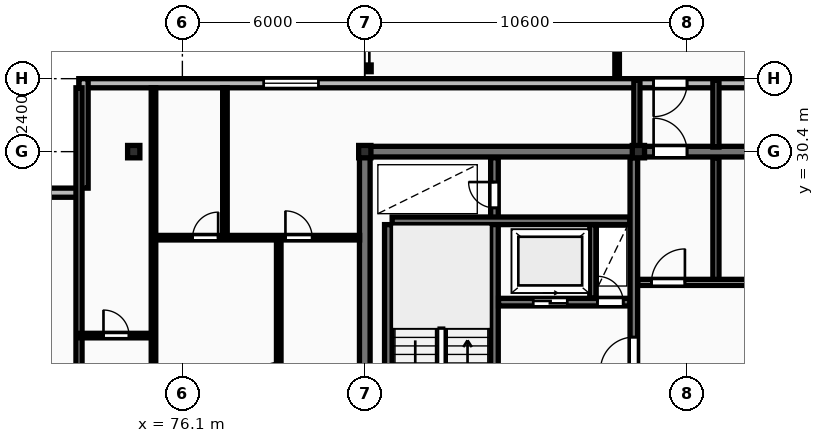
"""IFC4 building model, lengths in metres.
Left out: names, types, materials, properties, quantities, classifications, styles, units other than length and angle.
Written with IfcOpenShell. Run it as: python <this file> out.ifc"""

import sys

from ifc_helpers import new_model, si_unit, direction, frame, frame_2d, origin, origin_2d, place, context, subcontext, project, spatial, rectangle, i_section, extrude, element, fill, save


model = new_model("IFC4")
c1 = context("Model", 3, precision=1e-05, world=origin(), true_north=direction((0.0, 1.0)))
c2 = subcontext(c1, "Body", "Model", "MODEL_VIEW")
j1 = project(units=[si_unit("LENGTHUNIT", "METRE"), si_unit("PLANEANGLEUNIT", "RADIAN")], contexts=[c1])
p1 = place(None, origin())
s1 = spatial("IfcSite", under=j1, at=p1, CompositionType="ELEMENT")
p2 = place(p1, origin())
s2 = spatial("IfcBuilding", under=s1, at=p2, CompositionType="ELEMENT")
p3 = place(p2, frame((0.0, 0.0, 142.9)))
s3 = spatial("IfcBuildingStorey", under=s2, at=p3, CompositionType="ELEMENT", Elevation=142.9)
for number, where, z_axis, x_axis in (
    (1, (74.5, 30.4, 0.0), (0.0, 0.0, 1.0), (1.0, 0.0, 0.0)),
    (2, (82.1, 30.4, 0.0), (0.0, 0.0, 1.0), (1.0, 0.0, 0.0)),
    (3, (91.1, 30.4, 0.0), (0.0, 0.0, 1.0), (1.0, 0.0, 0.0)),
):
    element("IfcColumn", number, at=place(p3, frame(where, z_axis=z_axis, x_axis=x_axis)), inside=s3, PredefinedType="COLUMN", context=c2, shape_type="SweptSolid", body=[
        extrude(i_section(OverallWidth=0.403, OverallDepth=0.406, WebThickness=0.027, FlangeThickness=0.043, FilletRadius=0.015, at=origin_2d()), origin(), (0.0, 0.0, 1.0), 3.6),
    ])
p4 = place(p3, frame((130.7, 32.65, 0.0), z_axis=(0.0, 0.0, 1.0), x_axis=(-1.0, 0.0, 0.0)))
e4 = element("IfcWall", 4, at=p4, inside=s3, PredefinedType="STANDARD", context=c2, shape_type="SweptSolid", body=[
    extrude(rectangle(XDim=58.0, YDim=0.3, at=frame_2d((29.0, 0.0))), origin(), (0.0, 0.0, 1.0), 3.31),
])
p5 = place(p4, frame((50.125, 0.0, 0.85)))
e5 = element("IfcOpeningElement", 5, at=p5, cuts=e4, PredefinedType="OPENING", context=c2, shape_type="SweptSolid", body=[
    extrude(rectangle(XDim=1.8, YDim=1.8, at=frame_2d((0.9, 0.9))), frame((0.0, 0.16, 0.0), z_axis=(0.0, -1.0, 0.0), x_axis=(1.0, 0.0, 0.0)), (0.0, 0.0, 1.0), 0.32),
])
p6 = place(p4, frame((6.775, 0.0, 0.85)))
e6 = element("IfcOpeningElement", 6, at=p6, cuts=e4, PredefinedType="OPENING", context=c2, shape_type="SweptSolid", body=[
    extrude(rectangle(XDim=1.8, YDim=1.8, at=frame_2d((0.9, 0.9))), frame((0.0, 0.16, 0.0), z_axis=(0.0, -1.0, 0.0), x_axis=(1.0, 0.0, 0.0)), (0.0, 0.0, 1.0), 0.32),
])
p7 = place(p4, frame((38.0, 0.0, 0.0)))
e7 = element("IfcOpeningElement", 7, at=p7, cuts=e4, PredefinedType="OPENING", context=c2, shape_type="SweptSolid", body=[
    extrude(rectangle(XDim=1.1, YDim=2.1, at=frame_2d((0.55, 1.05))), frame((0.0, 0.16, 0.0), z_axis=(0.0, -1.0, 0.0), x_axis=(1.0, 0.0, 0.0)), (0.0, 0.0, 1.0), 0.32),
])
p8 = place(p3, frame((72.85, 32.8, 0.0), z_axis=(0.0, 0.0, 1.0), x_axis=(0.0, -1.0, 0.0)))
e8 = element("IfcWall", 8, at=p8, inside=s3, PredefinedType="STANDARD", context=c2, shape_type="SweptSolid", body=[
    extrude(rectangle(XDim=3.6, YDim=0.3, at=frame_2d((1.8, 0.0))), origin(), (0.0, 0.0, 1.0), 3.31),
])
p9 = place(p3, frame((72.7, 29.05, 0.0), z_axis=(0.0, 0.0, 1.0), x_axis=(-1.0, 0.0, 0.0)))
e9 = element("IfcWall", 9, at=p9, inside=s3, PredefinedType="STANDARD", context=c2, shape_type="SweptSolid", body=[
    extrude(rectangle(XDim=3.6, YDim=0.3, at=frame_2d((1.8, 0.0))), origin(), (0.0, 0.0, 1.0), 3.31),
])
p10 = place(p3, frame((81.925, 30.4, 0.0), z_axis=(0.0, 0.0, 1.0), x_axis=(1.0, 0.0, 0.0)))
e10 = element("IfcWall", 10, at=p10, inside=s3, PredefinedType="SHEAR", context=c2, shape_type="SweptSolid", body=[
    extrude(rectangle(XDim=36.265, YDim=0.35, at=frame_2d((18.132, 0.0))), origin(), (0.0, 0.0, 1.0), 3.6),
])
p11 = place(p10, frame((9.675, 0.0, 0.0)))
e11 = element("IfcOpeningElement", 11, at=p11, cuts=e10, PredefinedType="OPENING", context=c2, shape_type="SweptSolid", body=[
    extrude(rectangle(XDim=1.1, YDim=2.1, at=frame_2d((0.55, 1.05))), frame((0.0, 0.185, 0.0), z_axis=(0.0, -1.0, 0.0), x_axis=(1.0, 0.0, 0.0)), (0.0, 0.0, 1.0), 0.37),
])
p12 = place(p3, frame((82.1, 18.575, 0.0), z_axis=(0.0, 0.0, 1.0), x_axis=(0.0, 1.0, 0.0)))
e12 = element("IfcWall", 12, at=p12, inside=s3, PredefinedType="SHEAR", context=c2, shape_type="SweptSolid", body=[
    extrude(rectangle(XDim=11.65, YDim=0.35, at=frame_2d((5.825, 0.0))), origin(), (0.0, 0.0, 1.0), 3.6),
])
p13 = place(p3, frame((82.875, 20.4, 0.0), z_axis=(0.0, 0.0, 1.0), x_axis=(0.0, 1.0, 0.0)))
e13 = element("IfcWall", 13, at=p13, inside=s3, PredefinedType="SHEAR", context=c2, shape_type="SweptSolid", body=[
    extrude(rectangle(XDim=7.6, YDim=0.25, at=frame_2d((3.8, 0.0))), origin(), (0.0, 0.0, 1.0), 3.6),
])
p14 = place(p3, frame((86.365, 18.6, 0.0), z_axis=(0.0, 0.0, 1.0), x_axis=(0.0, 1.0, 0.0)))
e14 = element("IfcWall", 14, at=p14, inside=s3, PredefinedType="SHEAR", context=c2, shape_type="SweptSolid", body=[
    extrude(rectangle(XDim=11.6, YDim=0.25, at=frame_2d((5.8, 0.0))), origin(), (0.0, 0.0, 1.0), 3.6),
])
p15 = place(p14, frame((0.45, 0.0, 0.0)))
e15 = element("IfcOpeningElement", 15, at=p15, cuts=e14, PredefinedType="OPENING", context=c2, shape_type="SweptSolid", body=[
    extrude(rectangle(XDim=0.85, YDim=2.05, at=frame_2d((0.425, 1.025))), frame((0.0, 0.135, 0.0), z_axis=(0.0, -1.0, 0.0), x_axis=(1.0, 0.0, 0.0)), (0.0, 0.0, 1.0), 0.27),
])
p16 = place(p14, frame((2.05, 0.0, 0.0)))
e16 = element("IfcOpeningElement", 16, at=p16, cuts=e14, PredefinedType="OPENING", context=c2, shape_type="SweptSolid", body=[
    extrude(rectangle(XDim=1.1, YDim=2.1, at=frame_2d((0.55, 1.05))), frame((0.0, 0.135, 0.0), z_axis=(0.0, -1.0, 0.0), x_axis=(1.0, 0.0, 0.0)), (0.0, 0.0, 1.0), 0.27),
])
p17 = place(p14, frame((9.95, 0.0, 0.0)))
e17 = element("IfcOpeningElement", 17, at=p17, cuts=e14, PredefinedType="OPENING", context=c2, shape_type="SweptSolid", body=[
    extrude(rectangle(XDim=0.85, YDim=2.05, at=frame_2d((0.425, 1.025))), frame((0.0, 0.135, 0.0), z_axis=(0.0, -1.0, 0.0), x_axis=(1.0, 0.0, 0.0)), (0.0, 0.0, 1.0), 0.27),
])
p18 = place(p3, frame((83.0, 28.125, 0.0), z_axis=(0.0, 0.0, 1.0), x_axis=(1.0, 0.0, 0.0)))
e18 = element("IfcWall", 18, at=p18, inside=s3, PredefinedType="SHEAR", context=c2, shape_type="SweptSolid", body=[
    extrude(rectangle(XDim=7.82, YDim=0.25, at=frame_2d((3.91, 0.0))), origin(), (0.0, 0.0, 1.0), 3.6),
])
p19 = place(p3, frame((86.5, 25.45, 0.0), z_axis=(0.0, 0.0, 1.0), x_axis=(1.0, 0.0, 0.0)))
e19 = element("IfcWall", 19, at=p19, inside=s3, PredefinedType="SHEAR", context=c2, shape_type="SweptSolid", body=[
    extrude(rectangle(XDim=4.32, YDim=0.25, at=frame_2d((2.16, 0.0))), origin(), (0.0, 0.0, 1.0), 3.6),
])
p20 = place(p19, frame((1.14, 0.0, 0.0)))
e20 = element("IfcOpeningElement", 20, at=p20, cuts=e19, PredefinedType="OPENING", context=c2, shape_type="SweptSolid", body=[
    extrude(rectangle(XDim=1.12, YDim=2.12, at=frame_2d((0.56, 1.06))), frame((0.0, 0.135, 0.0), z_axis=(0.0, -1.0, 0.0), x_axis=(1.0, 0.0, 0.0)), (0.0, 0.0, 1.0), 0.27),
])
p21 = place(p19, frame((3.25, 0.0, 0.0)))
e21 = element("IfcOpeningElement", 21, at=p21, cuts=e19, PredefinedType="OPENING", context=c2, shape_type="SweptSolid", body=[
    extrude(rectangle(XDim=0.85, YDim=2.05, at=frame_2d((0.425, 1.025))), frame((0.0, 0.135, 0.0), z_axis=(0.0, -1.0, 0.0), x_axis=(1.0, 0.0, 0.0)), (0.0, 0.0, 1.0), 0.27),
])
p22 = place(p3, frame((89.6, 25.58, 0.0), z_axis=(0.0, 0.0, 1.0), x_axis=(0.0, 1.0, 0.0)))
e22 = element("IfcWall", 22, at=p22, inside=s3, PredefinedType="PARTITIONING", context=c2, shape_type="SweptSolid", body=[
    extrude(rectangle(XDim=2.42, YDim=0.2, at=frame_2d((1.21, 0.0))), origin(), (0.0, 0.0, 1.0), 3.31),
])
p23 = place(p3, frame((90.95, 18.6, 0.0), z_axis=(0.0, 0.0, 1.0), x_axis=(0.0, 1.0, 0.0)))
e23 = element("IfcWall", 23, at=p23, inside=s3, PredefinedType="SHEAR", context=c2, shape_type="SweptSolid", body=[
    extrude(rectangle(XDim=11.6, YDim=0.25, at=frame_2d((5.8, 0.0))), origin(), (0.0, 0.0, 1.0), 3.6),
])
p24 = place(p23, frame((4.6, 0.0, 0.0)))
e24 = element("IfcOpeningElement", 24, at=p24, cuts=e23, PredefinedType="OPENING", context=c2, shape_type="SweptSolid", body=[
    extrude(rectangle(XDim=1.1, YDim=2.1, at=frame_2d((0.55, 1.05))), frame((0.0, 0.135, 0.0), z_axis=(0.0, -1.0, 0.0), x_axis=(1.0, 0.0, 0.0)), (0.0, 0.0, 1.0), 0.27),
])
p25 = place(p3, frame((93.65, 26.1, 0.0), z_axis=(0.0, 0.0, 1.0), x_axis=(0.0, 1.0, 0.0)))
e25 = element("IfcWall", 25, at=p25, inside=s3, PredefinedType="PARTITIONING", context=c2, shape_type="SweptSolid", body=[
    extrude(rectangle(XDim=4.1, YDim=0.2, at=frame_2d((2.05, 0.0))), origin(), (0.0, 0.0, 1.0), 3.31),
])
p26 = place(p3, frame((91.08, 26.1, 0.0), z_axis=(0.0, 0.0, 1.0), x_axis=(1.0, 0.0, 0.0)))
e26 = element("IfcWall", 26, at=p26, inside=s3, PredefinedType="PARTITIONING", context=c2, shape_type="SweptSolid", body=[
    extrude(rectangle(XDim=8.34, YDim=0.2, at=frame_2d((4.17, 0.0))), origin(), (0.0, 0.0, 1.0), 3.31),
])
p27 = place(p26, frame((0.45, 0.0, 0.0)))
e27 = element("IfcOpeningElement", 27, at=p27, cuts=e26, PredefinedType="OPENING", context=c2, shape_type="SweptSolid", body=[
    extrude(rectangle(XDim=1.1, YDim=2.1, at=frame_2d((0.55, 1.05))), frame((0.0, 0.11, 0.0), z_axis=(0.0, -1.0, 0.0), x_axis=(1.0, 0.0, 0.0)), (0.0, 0.0, 1.0), 0.22),
])
p28 = place(p26, frame((4.6, 0.0, 0.0)))
e28 = element("IfcOpeningElement", 28, at=p28, cuts=e26, PredefinedType="OPENING", context=c2, shape_type="SweptSolid", body=[
    extrude(rectangle(XDim=0.92, YDim=2.08, at=frame_2d((0.46, 1.04))), frame((0.0, 0.11, 0.0), z_axis=(0.0, -1.0, 0.0), x_axis=(1.0, 0.0, 0.0)), (0.0, 0.0, 1.0), 0.22),
])
p29 = place(p3, frame((72.7, 18.4, 0.0), z_axis=(0.0, 0.0, 1.0), x_axis=(0.0, 1.0, 0.0)))
e29 = element("IfcWall", 29, at=p29, inside=s3, PredefinedType="PARTITIONING", context=c2, shape_type="SweptSolid", body=[
    extrude(rectangle(XDim=14.1, YDim=0.2, at=frame_2d((7.05, 0.0))), origin(), (0.0, 0.0, 1.0), 3.31),
])
p30 = place(p3, frame((72.7, 24.35, 0.0), z_axis=(0.0, 0.0, 1.0), x_axis=(1.0, 0.0, 0.0)))
e30 = element("IfcWall", 30, at=p30, inside=s3, PredefinedType="PARTITIONING", context=c2, shape_type="SweptSolid", body=[
    extrude(rectangle(XDim=2.45, YDim=0.15, at=frame_2d((1.225, 0.0))), origin(), (0.0, 0.0, 1.0), 3.31),
])
p31 = place(p30, frame((0.805, 0.0, 0.0)))
e31 = element("IfcOpeningElement", 31, at=p31, cuts=e30, PredefinedType="OPENING", context=c2, shape_type="SweptSolid", body=[
    extrude(rectangle(XDim=0.84, YDim=2.04, at=frame_2d((0.42, 1.02))), frame((0.0, 0.085, 0.0), z_axis=(0.0, -1.0, 0.0), x_axis=(1.0, 0.0, 0.0)), (0.0, 0.0, 1.0), 0.17),
])
p32 = place(p3, frame((75.15, 18.45, 0.0), z_axis=(0.0, 0.0, 1.0), x_axis=(0.0, 1.0, 0.0)))
e32 = element("IfcWall", 32, at=p32, inside=s3, PredefinedType="PARTITIONING", context=c2, shape_type="SweptSolid", body=[
    extrude(rectangle(XDim=14.05, YDim=0.15, at=frame_2d((7.025, 0.0))), origin(), (0.0, 0.0, 1.0), 3.31),
])
p33 = place(p32, frame((3.32, 0.0, 0.0)))
e33 = element("IfcOpeningElement", 33, at=p33, cuts=e32, PredefinedType="OPENING", context=c2, shape_type="SweptSolid", body=[
    extrude(rectangle(XDim=0.88, YDim=2.06, at=frame_2d((0.44, 1.03))), frame((0.0, 0.085, 0.0), z_axis=(0.0, -1.0, 0.0), x_axis=(1.0, 0.0, 0.0)), (0.0, 0.0, 1.0), 0.17),
])
p34 = place(p3, frame((79.27, 18.45, 0.0), z_axis=(0.0, 0.0, 1.0), x_axis=(0.0, 1.0, 0.0)))
e34 = element("IfcWall", 34, at=p34, inside=s3, PredefinedType="PARTITIONING", context=c2, shape_type="SweptSolid", body=[
    extrude(rectangle(XDim=9.12, YDim=0.15, at=frame_2d((4.56, 0.0))), origin(), (0.0, 0.0, 1.0), 3.31),
])
p35 = place(p34, frame((4.1, 0.0, 0.0)))
e35 = element("IfcOpeningElement", 35, at=p35, cuts=e34, PredefinedType="OPENING", context=c2, shape_type="SweptSolid", body=[
    extrude(rectangle(XDim=0.92, YDim=2.08, at=frame_2d((0.46, 1.04))), frame((0.0, 0.085, 0.0), z_axis=(0.0, -1.0, 0.0), x_axis=(1.0, 0.0, 0.0)), (0.0, 0.0, 1.0), 0.17),
])
p36 = place(p3, frame((77.5, 27.57, 0.0), z_axis=(0.0, 0.0, 1.0), x_axis=(0.0, 1.0, 0.0)))
e36 = element("IfcWall", 36, at=p36, inside=s3, PredefinedType="PARTITIONING", context=c2, shape_type="SweptSolid", body=[
    extrude(rectangle(XDim=4.93, YDim=0.15, at=frame_2d((2.465, 0.0))), origin(), (0.0, 0.0, 1.0), 3.31),
])
p37 = place(p3, frame((75.17, 27.57, 0.0), z_axis=(0.0, 0.0, 1.0), x_axis=(1.0, 0.0, 0.0)))
e37 = element("IfcWall", 37, at=p37, inside=s3, PredefinedType="PARTITIONING", context=c2, shape_type="SweptSolid", body=[
    extrude(rectangle(XDim=6.76, YDim=0.15, at=frame_2d((3.38, 0.0))), origin(), (0.0, 0.0, 1.0), 3.31),
])
p38 = place(p37, frame((1.266, 0.0, 0.0)))
e38 = element("IfcOpeningElement", 38, at=p38, cuts=e37, PredefinedType="OPENING", context=c2, shape_type="SweptSolid", body=[
    extrude(rectangle(XDim=0.84, YDim=2.04, at=frame_2d((0.42, 1.02))), frame((0.0, 0.085, 0.0), z_axis=(0.0, -1.0, 0.0), x_axis=(1.0, 0.0, 0.0)), (0.0, 0.0, 1.0), 0.17),
])
p39 = place(p37, frame((4.32, 0.0, 0.0)))
e39 = element("IfcOpeningElement", 39, at=p39, cuts=e37, PredefinedType="OPENING", context=c2, shape_type="SweptSolid", body=[
    extrude(rectangle(XDim=0.88, YDim=2.06, at=frame_2d((0.44, 1.03))), frame((0.0, 0.085, 0.0), z_axis=(0.0, -1.0, 0.0), x_axis=(1.0, 0.0, 0.0)), (0.0, 0.0, 1.0), 0.17),
])
p40 = place(p3, frame((91.05, 30.55, 0.0), z_axis=(0.0, 0.0, 1.0), x_axis=(0.0, 1.0, 0.0)))
e40 = element("IfcWall", 40, at=p40, inside=s3, PredefinedType="PARTITIONING", context=c2, shape_type="SweptSolid", body=[
    extrude(rectangle(XDim=2.2, YDim=0.2, at=frame_2d((1.1, 0.0))), origin(), (0.0, 0.0, 1.0), 3.31),
])
p41 = place(p3, frame((93.65, 30.55, 0.0), z_axis=(0.0, 0.0, 1.0), x_axis=(0.0, 1.0, 0.0)))
e41 = element("IfcWall", 41, at=p41, inside=s3, PredefinedType="PARTITIONING", context=c2, shape_type="SweptSolid", body=[
    extrude(rectangle(XDim=2.2, YDim=0.2, at=frame_2d((1.1, 0.0))), origin(), (0.0, 0.0, 1.0), 2.384),
])
p42 = place(p3, frame((90.4, 32.9, 0.0), z_axis=(0.0, 0.0, 1.0), x_axis=(0.0, 1.0, 0.0)))
e42 = element("IfcWall", 42, at=p42, inside=s3, PredefinedType="PARTITIONING", context=c2, shape_type="SweptSolid", body=[
    extrude(rectangle(XDim=17.8, YDim=0.15, at=frame_2d((8.9, 0.0))), origin(), (0.0, 0.0, 1.0), 3.31),
])
p43 = place(p42, frame((8.2, 0.0, 0.0)))
e43 = element("IfcOpeningElement", 43, at=p43, cuts=e42, PredefinedType="OPENING", context=c2, shape_type="SweptSolid", body=[
    extrude(rectangle(XDim=1.22, YDim=2.18, at=frame_2d((0.61, 1.09))), frame((0.0, 0.085, 0.0), z_axis=(0.0, -1.0, 0.0), x_axis=(1.0, 0.0, 0.0)), (0.0, 0.0, 1.0), 0.17),
])
p44 = place(p5, origin())
e44 = element("IfcWindow", 44, at=p44, inside=s3, PartitioningType="SINGLE_PANEL", PredefinedType="WINDOW", context=c2, shape_type="SweptSolid", body=[
    extrude(rectangle(XDim=1.8, YDim=1.8, at=frame_2d((0.9, 0.9))), frame((0.0, 0.03, 0.0), z_axis=(0.0, -1.0, 0.0), x_axis=(1.0, 0.0, 0.0)), (0.0, 0.0, 1.0), 0.06),
])
fill(e5, e44)
p45 = place(p7, origin())
e45 = element("IfcDoor", 45, at=p45, inside=s3, OperationType="SINGLE_SWING_RIGHT", PredefinedType="DOOR", context=c2, shape_type="SweptSolid", body=[
    extrude(rectangle(XDim=1.1, YDim=2.1, at=frame_2d((0.55, 1.05))), frame((0.0, 0.025, 0.0), z_axis=(0.0, -1.0, 0.0), x_axis=(1.0, 0.0, 0.0)), (0.0, 0.0, 1.0), 0.05),
])
fill(e7, e45)
p46 = place(p11, origin())
e46 = element("IfcDoor", 46, at=p46, inside=s3, OperationType="SINGLE_SWING_LEFT", PredefinedType="DOOR", context=c2, shape_type="SweptSolid", body=[
    extrude(rectangle(XDim=1.1, YDim=2.1, at=frame_2d((0.55, 1.05))), frame((0.0, 0.025, 0.0), z_axis=(0.0, -1.0, 0.0), x_axis=(1.0, 0.0, 0.0)), (0.0, 0.0, 1.0), 0.05),
])
fill(e11, e46)
p47 = place(p17, origin())
e47 = element("IfcDoor", 47, at=p47, inside=s3, OperationType="SINGLE_SWING_RIGHT", PredefinedType="DOOR", context=c2, shape_type="SweptSolid", body=[
    extrude(rectangle(XDim=0.85, YDim=2.05, at=frame_2d((0.425, 1.025))), frame((0.0, 0.025, 0.0), z_axis=(0.0, -1.0, 0.0), x_axis=(1.0, 0.0, 0.0)), (0.0, 0.0, 1.0), 0.05),
])
fill(e17, e47)
p48 = place(p20, origin())
e48 = element("IfcDoor", 48, at=p48, inside=s3, OperationType="SLIDING_TO_RIGHT", PredefinedType="DOOR", context=c2, shape_type="SweptSolid", body=[
    extrude(rectangle(XDim=1.12, YDim=2.12, at=frame_2d((0.56, 1.06))), frame((0.0, 0.025, 0.0), z_axis=(0.0, -1.0, 0.0), x_axis=(1.0, 0.0, 0.0)), (0.0, 0.0, 1.0), 0.05),
])
fill(e20, e48)
p49 = place(p21, origin())
e49 = element("IfcDoor", 49, at=p49, inside=s3, OperationType="SINGLE_SWING_LEFT", PredefinedType="DOOR", context=c2, shape_type="SweptSolid", body=[
    extrude(rectangle(XDim=0.85, YDim=2.05, at=frame_2d((0.425, 1.025))), frame((0.0, 0.025, 0.0), z_axis=(0.0, -1.0, 0.0), x_axis=(1.0, 0.0, 0.0)), (0.0, 0.0, 1.0), 0.05),
])
fill(e21, e49)
p50 = place(p24, origin())
e50 = element("IfcDoor", 50, at=p50, inside=s3, OperationType="SINGLE_SWING_LEFT", PredefinedType="DOOR", context=c2, shape_type="SweptSolid", body=[
    extrude(rectangle(XDim=1.1, YDim=2.1, at=frame_2d((0.55, 1.05))), frame((0.0, 0.025, 0.0), z_axis=(0.0, -1.0, 0.0), x_axis=(1.0, 0.0, 0.0)), (0.0, 0.0, 1.0), 0.05),
])
fill(e24, e50)
p51 = place(p27, origin())
e51 = element("IfcDoor", 51, at=p51, inside=s3, OperationType="SINGLE_SWING_RIGHT", PredefinedType="DOOR", context=c2, shape_type="SweptSolid", body=[
    extrude(rectangle(XDim=1.1, YDim=2.1, at=frame_2d((0.55, 1.05))), frame((0.0, 0.025, 0.0), z_axis=(0.0, -1.0, 0.0), x_axis=(1.0, 0.0, 0.0)), (0.0, 0.0, 1.0), 0.05),
])
fill(e27, e51)
p52 = place(p31, origin())
e52 = element("IfcDoor", 52, at=p52, inside=s3, OperationType="SINGLE_SWING_LEFT", PredefinedType="DOOR", context=c2, shape_type="SweptSolid", body=[
    extrude(rectangle(XDim=0.84, YDim=2.04, at=frame_2d((0.42, 1.02))), frame((0.0, 0.025, 0.0), z_axis=(0.0, -1.0, 0.0), x_axis=(1.0, 0.0, 0.0)), (0.0, 0.0, 1.0), 0.05),
])
fill(e31, e52)
p53 = place(p35, origin())
e53 = element("IfcDoor", 53, at=p53, inside=s3, OperationType="SINGLE_SWING_LEFT", PredefinedType="DOOR", context=c2, shape_type="SweptSolid", body=[
    extrude(rectangle(XDim=0.92, YDim=2.08, at=frame_2d((0.46, 1.04))), frame((0.0, 0.025, 0.0), z_axis=(0.0, -1.0, 0.0), x_axis=(1.0, 0.0, 0.0)), (0.0, 0.0, 1.0), 0.05),
])
fill(e35, e53)
p54 = place(p38, origin())
e54 = element("IfcDoor", 54, at=p54, inside=s3, OperationType="SINGLE_SWING_RIGHT", PredefinedType="DOOR", context=c2, shape_type="SweptSolid", body=[
    extrude(rectangle(XDim=0.84, YDim=2.04, at=frame_2d((0.42, 1.02))), frame((0.0, 0.025, 0.0), z_axis=(0.0, -1.0, 0.0), x_axis=(1.0, 0.0, 0.0)), (0.0, 0.0, 1.0), 0.05),
])
fill(e38, e54)
p55 = place(p39, origin())
e55 = element("IfcDoor", 55, at=p55, inside=s3, OperationType="SINGLE_SWING_LEFT", PredefinedType="DOOR", context=c2, shape_type="SweptSolid", body=[
    extrude(rectangle(XDim=0.88, YDim=2.06, at=frame_2d((0.44, 1.03))), frame((0.0, 0.025, 0.0), z_axis=(0.0, -1.0, 0.0), x_axis=(1.0, 0.0, 0.0)), (0.0, 0.0, 1.0), 0.05),
])
fill(e39, e55)
save(model, sys.argv[1])
